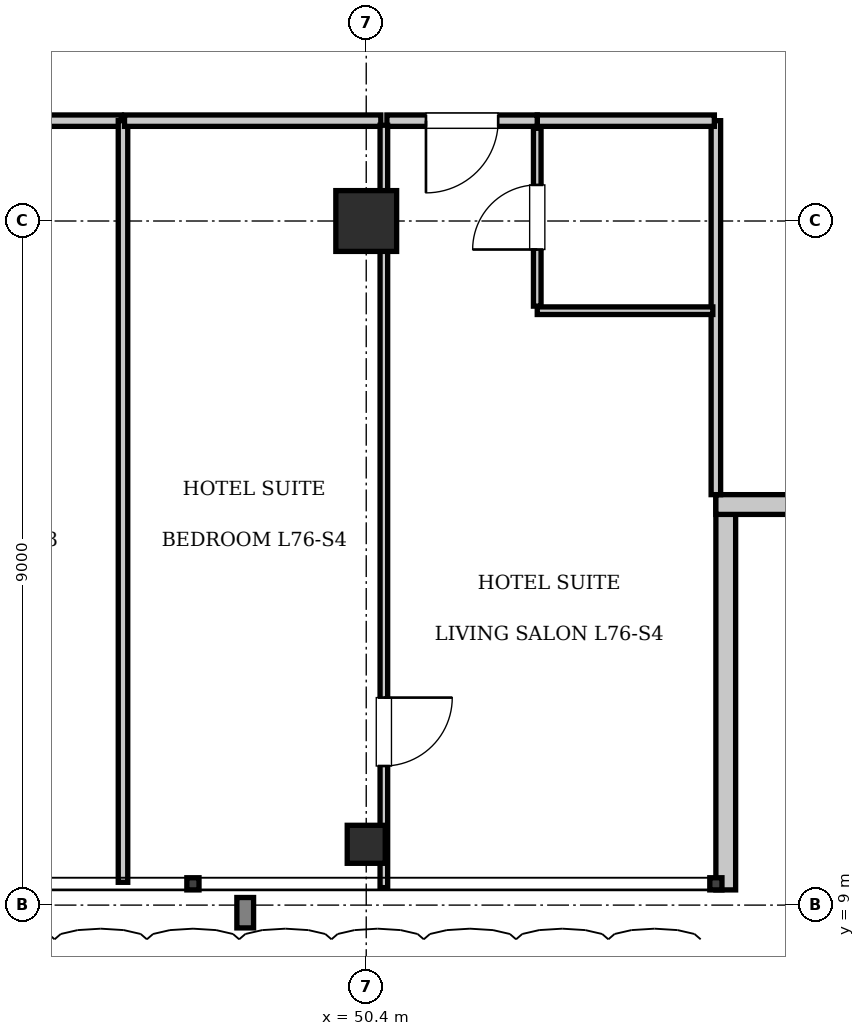
"""IFC4 building model, lengths in metres.
Left out: names, types, materials, properties, quantities, classifications, styles, units other than length and angle.
Written with IfcOpenShell. Run it as: python <this file> out.ifc"""

import sys

from ifc_helpers import new_model, si_unit, direction, frame, frame_2d, origin, origin_2d, place, context, subcontext, project, spatial, rectangle, i_section, extrude, element, fill, save


model = new_model("IFC4")
c1 = context("Model", 3, precision=1e-05, world=origin(), true_north=direction((0.0, 1.0)))
c2 = subcontext(c1, "Body", "Model", "MODEL_VIEW")
j1 = project(units=[si_unit("LENGTHUNIT", "METRE"), si_unit("PLANEANGLEUNIT", "RADIAN")], contexts=[c1])
p1 = place(None, origin())
s1 = spatial("IfcSite", under=j1, at=p1, CompositionType="ELEMENT")
p2 = place(p1, origin())
s2 = spatial("IfcBuilding", under=s1, at=p2, CompositionType="ELEMENT")
p3 = place(p2, frame((0.0, 0.0, 308.7)))
s3 = spatial("IfcBuildingStorey", under=s2, at=p3, CompositionType="ELEMENT", Elevation=308.7)
p4 = place(p3, frame((50.4, 18.0, 0.0), z_axis=(0.0, 0.0, 1.0), x_axis=(1.0, 0.0, 0.0)))
e1 = element("IfcColumn", 1, at=p4, inside=s3, PredefinedType="COLUMN", context=c2, shape_type="SweptSolid", body=[
    extrude(rectangle(XDim=0.8, YDim=0.8, at=origin_2d()), origin(), (0.0, 0.0, 1.0), 3.85),
])
p5 = place(p3, frame((50.4, 9.8, 0.0), z_axis=(0.0, 0.0, 1.0), x_axis=(1.0, 0.0, 0.0)))
e2 = element("IfcColumn", 2, at=p5, inside=s3, PredefinedType="COLUMN", context=c2, shape_type="SweptSolid", body=[
    extrude(i_section(OverallWidth=0.5, OverallDepth=0.5, WebThickness=0.022, FlangeThickness=0.032, at=origin_2d()), origin(), (0.0, 0.0, 1.0), 3.85),
])
p6 = place(p3, frame((55.13, 14.4, 0.0), z_axis=(0.0, 0.0, 1.0), x_axis=(0.0, -1.0, 0.0)))
e3 = element("IfcWall", 3, at=p6, inside=s3, PredefinedType="SOLIDWALL", context=c2, shape_type="SweptSolid", body=[
    extrude(rectangle(XDim=5.2, YDim=0.26, at=frame_2d((2.6, 0.0))), origin(), (0.0, 0.0, 1.0), 3.61),
])
p7 = place(p3, frame((60.2, 14.27, 0.0), z_axis=(0.0, 0.0, 1.0), x_axis=(-1.0, 0.0, 0.0)))
e4 = element("IfcWall", 4, at=p7, inside=s3, PredefinedType="SOLIDWALL", context=c2, shape_type="SweptSolid", body=[
    extrude(rectangle(XDim=5.2, YDim=0.26, at=frame_2d((2.6, 0.0))), origin(), (0.0, 0.0, 1.0), 3.61),
])
p8 = place(p7, frame((1.6, 0.0, 0.9)))
e5 = element("IfcOpeningElement", 5, at=p8, cuts=e4, PredefinedType="OPENING", context=c2, shape_type="SweptSolid", body=[
    extrude(rectangle(XDim=2.0, YDim=2.2, at=frame_2d((1.0, 1.1))), frame((0.0, 0.14, 0.0), z_axis=(0.0, -1.0, 0.0), x_axis=(1.0, 0.0, 0.0)), (0.0, 0.0, 1.0), 0.28),
])
p9 = place(p3, frame((55.0, 14.4, 0.0), z_axis=(0.0, 0.0, 1.0), x_axis=(0.0, 1.0, 0.0)))
e6 = element("IfcWall", 6, at=p9, inside=s3, PredefinedType="PARTITIONING", context=c2, shape_type="SweptSolid", body=[
    extrude(rectangle(XDim=4.92, YDim=0.125, at=frame_2d((2.46, 0.0))), origin(), (0.0, 0.0, 1.0), 3.61),
])
p10 = place(p3, frame((43.104, 19.32, 0.0), z_axis=(0.0, 0.0, 1.0), x_axis=(1.0, 0.0, 0.0)))
e7 = element("IfcWall", 7, at=p10, inside=s3, PredefinedType="PARTITIONING", context=c2, shape_type="SweptSolid", body=[
    extrude(rectangle(XDim=4.076, YDim=0.15, at=frame_2d((2.038, 0.0))), origin(), (0.0, 0.0, 1.0), 3.61),
])
p11 = place(p3, frame((47.2, 9.3, 0.0), z_axis=(0.0, 0.0, 1.0), x_axis=(0.0, 1.0, 0.0)))
e8 = element("IfcWall", 8, at=p11, inside=s3, PredefinedType="PARTITIONING", context=c2, shape_type="SweptSolid", body=[
    extrude(rectangle(XDim=10.02, YDim=0.125, at=frame_2d((5.01, 0.0))), origin(), (0.0, 0.0, 1.0), 3.61),
])
p12 = place(p3, frame((52.65, 19.32, 0.0), z_axis=(0.0, 0.0, 1.0), x_axis=(1.0, 0.0, 0.0)))
e9 = element("IfcWall", 9, at=p12, inside=s3, PredefinedType="PARTITIONING", context=c2, shape_type="SweptSolid", body=[
    extrude(rectangle(XDim=2.33, YDim=0.15, at=frame_2d((1.165, 0.0))), origin(), (0.0, 0.0, 1.0), 3.61),
])
p13 = place(p3, frame((52.65, 16.82, 0.0), z_axis=(0.0, 0.0, 1.0), x_axis=(1.0, 0.0, 0.0)))
e10 = element("IfcWall", 10, at=p13, inside=s3, PredefinedType="PARTITIONING", context=c2, shape_type="SweptSolid", body=[
    extrude(rectangle(XDim=2.31, YDim=0.1, at=frame_2d((1.155, 0.0))), origin(), (0.0, 0.0, 1.0), 3.61),
])
p14 = place(p3, frame((52.65, 16.88, 0.0), z_axis=(0.0, 0.0, 1.0), x_axis=(0.0, 1.0, 0.0)))
e11 = element("IfcWall", 11, at=p14, inside=s3, PredefinedType="PARTITIONING", context=c2, shape_type="SweptSolid", body=[
    extrude(rectangle(XDim=2.34, YDim=0.1, at=frame_2d((1.17, 0.0))), origin(), (0.0, 0.0, 1.0), 3.61),
])
p15 = place(p14, frame((0.745, 0.0, 0.0)))
e12 = element("IfcOpeningElement", 12, at=p15, cuts=e11, PredefinedType="OPENING", context=c2, shape_type="SweptSolid", body=[
    extrude(rectangle(XDim=0.85, YDim=2.1, at=frame_2d((0.425, 1.05))), frame((0.0, 0.06, 0.0), z_axis=(0.0, -1.0, 0.0), x_axis=(1.0, 0.0, 0.0)), (0.0, 0.0, 1.0), 0.12),
])
p16 = place(p3, frame((47.22, 19.32, 0.0), z_axis=(0.0, 0.0, 1.0), x_axis=(1.0, 0.0, 0.0)))
e13 = element("IfcWall", 13, at=p16, inside=s3, PredefinedType="PARTITIONING", context=c2, shape_type="SweptSolid", body=[
    extrude(rectangle(XDim=3.372, YDim=0.15, at=frame_2d((1.686, 0.0))), origin(), (0.0, 0.0, 1.0), 3.61),
])
p17 = place(p3, frame((50.672, 19.32, 0.0), z_axis=(0.0, 0.0, 1.0), x_axis=(1.0, 0.0, 0.0)))
e14 = element("IfcWall", 14, at=p17, inside=s3, PredefinedType="PARTITIONING", context=c2, shape_type="SweptSolid", body=[
    extrude(rectangle(XDim=1.978, YDim=0.15, at=frame_2d((0.989, 0.0))), origin(), (0.0, 0.0, 1.0), 3.61),
])
p18 = place(p17, frame((0.514, 0.0, 0.0)))
e15 = element("IfcOpeningElement", 15, at=p18, cuts=e14, PredefinedType="OPENING", context=c2, shape_type="SweptSolid", body=[
    extrude(rectangle(XDim=0.95, YDim=2.15, at=frame_2d((0.475, 1.075))), frame((0.0, 0.085, 0.0), z_axis=(0.0, -1.0, 0.0), x_axis=(1.0, 0.0, 0.0)), (0.0, 0.0, 1.0), 0.17),
])
p19 = place(p3, frame((50.632, 9.23, 0.0), z_axis=(0.0, 0.0, 1.0), x_axis=(0.0, 1.0, 0.0)))
e16 = element("IfcWall", 16, at=p19, inside=s3, PredefinedType="PARTITIONING", context=c2, shape_type="SweptSolid", body=[
    extrude(rectangle(XDim=10.03, YDim=0.1, at=frame_2d((5.015, 0.0))), origin(), (0.0, 0.0, 1.0), 3.61),
])
p20 = place(p19, frame((1.6, 0.0, 0.0)))
e17 = element("IfcOpeningElement", 17, at=p20, cuts=e16, PredefinedType="OPENING", context=c2, shape_type="SweptSolid", body=[
    extrude(rectangle(XDim=0.9, YDim=2.1, at=frame_2d((0.45, 1.05))), frame((0.0, 0.06, 0.0), z_axis=(0.0, -1.0, 0.0), x_axis=(1.0, 0.0, 0.0)), (0.0, 0.0, 1.0), 0.12),
])
p21 = place(p15, origin())
e18 = element("IfcDoor", 18, at=p21, inside=s3, OperationType="SINGLE_SWING_LEFT", PredefinedType="DOOR", context=c2, shape_type="SweptSolid", body=[
    extrude(rectangle(XDim=0.85, YDim=2.1, at=frame_2d((0.425, 1.05))), frame((0.0, 0.025, 0.0), z_axis=(0.0, -1.0, 0.0), x_axis=(1.0, 0.0, 0.0)), (0.0, 0.0, 1.0), 0.05),
])
fill(e12, e18)
p22 = place(p18, frame((0.95, 0.0, 0.0), z_axis=(0.0, 0.0, 1.0), x_axis=(-1.0, 0.0, 0.0)))
e19 = element("IfcDoor", 19, at=p22, inside=s3, OperationType="SINGLE_SWING_RIGHT", PredefinedType="DOOR", context=c2, shape_type="SweptSolid", body=[
    extrude(rectangle(XDim=0.95, YDim=2.15, at=frame_2d((0.475, 1.075))), frame((0.0, 0.025, 0.0), z_axis=(0.0, -1.0, 0.0), x_axis=(1.0, 0.0, 0.0)), (0.0, 0.0, 1.0), 0.05),
])
fill(e15, e19)
p23 = place(p20, frame((0.9, 0.0, 0.0), z_axis=(0.0, 0.0, 1.0), x_axis=(-1.0, 0.0, 0.0)))
e20 = element("IfcDoor", 20, at=p23, inside=s3, OperationType="SINGLE_SWING_LEFT", PredefinedType="DOOR", context=c2, shape_type="SweptSolid", body=[
    extrude(rectangle(XDim=0.9, YDim=2.1, at=frame_2d((0.45, 1.05))), frame((0.0, 0.025, 0.0), z_axis=(0.0, -1.0, 0.0), x_axis=(1.0, 0.0, 0.0)), (0.0, 0.0, 1.0), 0.05),
])
fill(e17, e20)
save(model, sys.argv[1])
